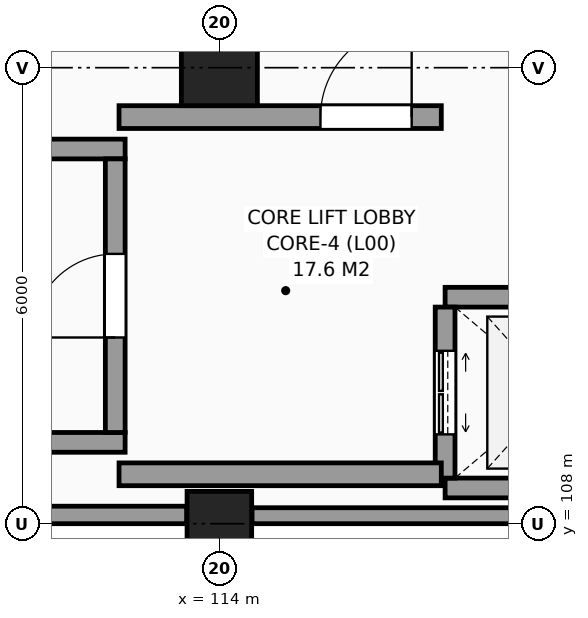
"""IFC4 building model, lengths in metres.
Left out: names, types, materials, properties, quantities, classifications, styles, units other than length and angle.
Written with IfcOpenShell. Run it as: python <this file> out.ifc"""

import sys

from ifc_helpers import new_model, si_unit, direction, frame, frame_2d, origin, origin_2d, place, context, subcontext, project, spatial, rectangle, circle, extrude, element, fill, save


model = new_model("IFC4")
c1 = context("Model", 3, precision=1e-05, world=origin(), true_north=direction((0.0, 1.0)))
c2 = subcontext(c1, "Body", "Model", "MODEL_VIEW")
j1 = project(units=[si_unit("LENGTHUNIT", "METRE"), si_unit("PLANEANGLEUNIT", "RADIAN")], contexts=[c1])
p1 = place(None, origin())
s1 = spatial("IfcSite", under=j1, at=p1, CompositionType="ELEMENT")
p2 = place(p1, origin())
s2 = spatial("IfcBuilding", under=s1, at=p2, CompositionType="ELEMENT")
p3 = place(p2, origin())
s3 = spatial("IfcBuildingStorey", under=s2, at=p3, CompositionType="ELEMENT", Elevation=0.0)
p4 = place(p3, frame((114.0, 108.0, 0.0), z_axis=(0.0, 0.0, 1.0), x_axis=(1.0, 0.0, 0.0)))
e1 = element("IfcColumn", 1, at=p4, inside=s3, PredefinedType="COLUMN", context=c2, shape_type="SweptSolid", body=[
    extrude(circle(Radius=0.425, at=origin_2d()), origin(), (0.0, 0.0, 1.0), 6.0),
])
p5 = place(p3, frame((114.0, 114.0, 0.0), z_axis=(0.0, 0.0, 1.0), x_axis=(1.0, 0.0, 0.0)))
e2 = element("IfcColumn", 2, at=p5, inside=s3, PredefinedType="COLUMN", context=c2, shape_type="SweptSolid", body=[
    extrude(circle(Radius=0.5, at=origin_2d()), origin(), (0.0, 0.0, 1.0), 6.0),
])
p6 = place(p3, frame((108.38, 108.115, 0.0), z_axis=(0.0, 0.0, 1.0), x_axis=(1.0, 0.0, 0.0)))
e3 = element("IfcWall", 3, at=p6, inside=s3, PredefinedType="SOLIDWALL", context=c2, shape_type="SweptSolid", body=[
    extrude(rectangle(XDim=5.19, YDim=0.23, at=frame_2d((2.595, 0.0))), origin(), (0.0, 0.0, 1.0), 4.99),
])
p7 = place(p3, frame((114.43, 108.105, 0.0), z_axis=(0.0, 0.0, 1.0), x_axis=(1.0, 0.0, 0.0)))
e4 = element("IfcWall", 4, at=p7, inside=s3, PredefinedType="SOLIDWALL", context=c2, shape_type="SweptSolid", body=[
    extrude(rectangle(XDim=5.065, YDim=0.21, at=frame_2d((2.533, 0.0))), origin(), (0.0, 0.0, 1.0), 4.99),
])
for number, where, z_axis, x_axis in (
    (5, (102.04, 109.07, 0.0), (0.0, 0.0, 1.0), (1.0, 0.0, 0.0)),
    (6, (102.04, 112.93, 0.0), (0.0, 0.0, 1.0), (1.0, 0.0, 0.0)),
):
    element("IfcWall", number, at=place(p3, frame(where, z_axis=z_axis, x_axis=x_axis)), inside=s3, PredefinedType="SHEAR", context=c2, shape_type="SweptSolid", body=[
        extrude(rectangle(XDim=10.72, YDim=0.26, at=frame_2d((5.36, 0.0))), origin(), (0.0, 0.0, 1.0), 6.0),
    ])
p8 = place(p3, frame((112.63, 109.2, 0.0), z_axis=(0.0, 0.0, 1.0), x_axis=(0.0, 1.0, 0.0)))
e7 = element("IfcWall", 7, at=p8, inside=s3, PredefinedType="SHEAR", context=c2, shape_type="SweptSolid", body=[
    extrude(rectangle(XDim=3.6, YDim=0.26, at=frame_2d((1.8, 0.0))), origin(), (0.0, 0.0, 1.0), 6.0),
])
p9 = place(p8, frame((1.25, 0.0, 0.0)))
e8 = element("IfcOpeningElement", 8, at=p9, cuts=e7, PredefinedType="OPENING", context=c2, shape_type="SweptSolid", body=[
    extrude(rectangle(XDim=1.1, YDim=2.15, at=frame_2d((0.55, 1.075))), frame((0.0, 0.14, 0.0), z_axis=(0.0, -1.0, 0.0), x_axis=(1.0, 0.0, 0.0)), (0.0, 0.0, 1.0), 0.28),
])
for number, where, z_axis, x_axis in (
    (9, (116.97, 108.47, 0.0), (0.0, 0.0, 1.0), (1.0, 0.0, 0.0)),
    (10, (116.97, 110.98, 0.0), (0.0, 0.0, 1.0), (1.0, 0.0, 0.0)),
):
    element("IfcWall", number, at=place(p3, frame(where, z_axis=z_axis, x_axis=x_axis)), inside=s3, PredefinedType="SHEAR", context=c2, shape_type="SweptSolid", body=[
        extrude(rectangle(XDim=2.91, YDim=0.26, at=frame_2d((1.455, 0.0))), origin(), (0.0, 0.0, 1.0), 6.0),
    ])
p10 = place(p3, frame((116.97, 108.6, 0.0), z_axis=(0.0, 0.0, 1.0), x_axis=(0.0, 1.0, 0.0)))
e11 = element("IfcWall", 11, at=p10, inside=s3, PredefinedType="SHEAR", context=c2, shape_type="SweptSolid", body=[
    extrude(rectangle(XDim=2.25, YDim=0.26, at=frame_2d((1.125, 0.0))), origin(), (0.0, 0.0, 1.0), 6.0),
])
p11 = place(p10, frame((0.575, 0.0, 0.0)))
e12 = element("IfcOpeningElement", 12, at=p11, cuts=e11, PredefinedType="OPENING", context=c2, shape_type="SweptSolid", body=[
    extrude(rectangle(XDim=1.1, YDim=2.2, at=frame_2d((0.55, 1.1))), frame((0.0, 0.14, 0.0), z_axis=(0.0, -1.0, 0.0), x_axis=(1.0, 0.0, 0.0)), (0.0, 0.0, 1.0), 0.28),
])
p12 = place(p3, frame((112.68, 113.35, 0.0), z_axis=(0.0, 0.0, 1.0), x_axis=(1.0, 0.0, 0.0)))
e13 = element("IfcWall", 13, at=p12, inside=s3, PredefinedType="SHEAR", context=c2, shape_type="SweptSolid", body=[
    extrude(rectangle(XDim=4.24, YDim=0.3, at=frame_2d((2.12, 0.0))), origin(), (0.0, 0.0, 1.0), 6.0),
])
p13 = place(p12, frame((2.65, 0.0, 0.0)))
e14 = element("IfcOpeningElement", 14, at=p13, cuts=e13, PredefinedType="OPENING", context=c2, shape_type="SweptSolid", body=[
    extrude(rectangle(XDim=1.2, YDim=2.2, at=frame_2d((0.6, 1.1))), frame((0.0, 0.16, 0.0), z_axis=(0.0, -1.0, 0.0), x_axis=(1.0, 0.0, 0.0)), (0.0, 0.0, 1.0), 0.32),
])
p14 = place(p3, frame((112.68, 108.65, 0.0), z_axis=(0.0, 0.0, 1.0), x_axis=(1.0, 0.0, 0.0)))
e15 = element("IfcWall", 15, at=p14, inside=s3, PredefinedType="SHEAR", context=c2, shape_type="SweptSolid", body=[
    extrude(rectangle(XDim=4.24, YDim=0.3, at=frame_2d((2.12, 0.0))), origin(), (0.0, 0.0, 1.0), 6.0),
])
p15 = place(p9, origin())
e16 = element("IfcDoor", 16, at=p15, inside=s3, OperationType="SINGLE_SWING_LEFT", PredefinedType="DOOR", context=c2, shape_type="SweptSolid", body=[
    extrude(rectangle(XDim=1.1, YDim=2.15, at=frame_2d((0.55, 1.075))), frame((0.0, 0.025, 0.0), z_axis=(0.0, -1.0, 0.0), x_axis=(1.0, 0.0, 0.0)), (0.0, 0.0, 1.0), 0.05),
])
fill(e8, e16)
p16 = place(p11, origin())
e17 = element("IfcDoor", 17, at=p16, inside=s3, OperationType="DOUBLE_DOOR_SLIDING", PredefinedType="DOOR", context=c2, shape_type="SweptSolid", body=[
    extrude(rectangle(XDim=1.1, YDim=2.2, at=frame_2d((0.55, 1.1))), frame((0.0, 0.025, 0.0), z_axis=(0.0, -1.0, 0.0), x_axis=(1.0, 0.0, 0.0)), (0.0, 0.0, 1.0), 0.05),
])
fill(e12, e17)
p17 = place(p13, origin())
e18 = element("IfcDoor", 18, at=p17, inside=s3, OperationType="SINGLE_SWING_RIGHT", PredefinedType="DOOR", context=c2, shape_type="SweptSolid", body=[
    extrude(rectangle(XDim=1.2, YDim=2.2, at=frame_2d((0.6, 1.1))), frame((0.0, 0.025, 0.0), z_axis=(0.0, -1.0, 0.0), x_axis=(1.0, 0.0, 0.0)), (0.0, 0.0, 1.0), 0.05),
])
fill(e14, e18)
save(model, sys.argv[1])
